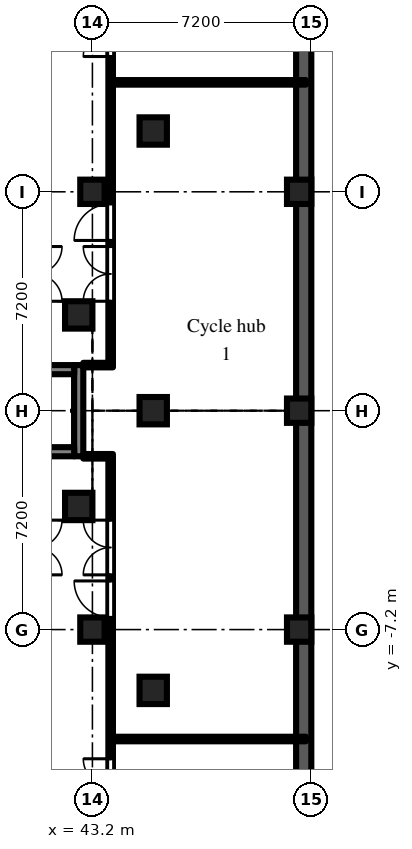
"""IFC4 building model, lengths in metres.
Left out: names, types, materials, properties, quantities, classifications, styles, units other than length and angle.
Written with IfcOpenShell. Run it as: python <this file> out.ifc"""

import sys

from ifc_helpers import new_model, si_unit, direction, frame, frame_2d, origin, origin_2d, place, context, subcontext, project, spatial, rectangle, extrude, element, fill, save


model = new_model("IFC4")
c1 = context("Model", 3, precision=1e-05, world=origin(), true_north=direction((0.0, 1.0)))
c2 = subcontext(c1, "Body", "Model", "MODEL_VIEW")
j1 = project(units=[si_unit("LENGTHUNIT", "METRE"), si_unit("PLANEANGLEUNIT", "RADIAN")], contexts=[c1])
p1 = place(None, origin())
s1 = spatial("IfcSite", under=j1, at=p1, CompositionType="ELEMENT")
p2 = place(p1, origin())
s2 = spatial("IfcBuilding", under=s1, at=p2, CompositionType="ELEMENT")
p3 = place(p2, frame((0.0, 0.0, -4.8)))
s3 = spatial("IfcBuildingStorey", under=s2, at=p3, CompositionType="ELEMENT", Elevation=-4.8)
p4 = place(p3, frame((50.15, -49.9, -0.5), z_axis=(0.0, 0.0, 1.0), x_axis=(0.0, 1.0, 0.0)))
e1 = element("IfcWall", 1, at=p4, inside=s3, PredefinedType="SOLIDWALL", context=c2, shape_type="SweptSolid", body=[
    extrude(rectangle(XDim=99.8, YDim=0.5, at=frame_2d((49.9, 0.0))), origin(), (0.0, 0.0, 1.0), 5.3),
])
for number, where, z_axis, x_axis in (
    (2, (42.75, -3.15, -0.5), (0.0, 0.0, 1.0), (1.0, 0.0, 0.0)),
    (3, (42.75, 3.15, -0.5), (0.0, 0.0, 1.0), (1.0, 0.0, 0.0)),
):
    element("IfcColumn", number, at=place(p3, frame(where, z_axis=z_axis, x_axis=x_axis)), inside=s3, PredefinedType="COLUMN", context=c2, shape_type="SweptSolid", body=[
        extrude(rectangle(XDim=0.9, YDim=0.9, at=origin_2d()), origin(), (0.0, 0.0, 1.0), 5.3),
    ])
for number, where, z_axis, x_axis in (
    (4, (43.2, -7.2, -0.5), (0.0, 0.0, 1.0), (1.0, 0.0, 0.0)),
    (5, (43.2, 7.2, -0.5), (0.0, 0.0, 1.0), (1.0, 0.0, 0.0)),
    (6, (50.0, -7.2, -0.5), (0.0, 0.0, 1.0), (1.0, 0.0, 0.0)),
    (7, (50.0, 0.0, -0.5), (0.0, 0.0, 1.0), (1.0, 0.0, 0.0)),
    (8, (50.0, 7.2, -0.5), (0.0, 0.0, 1.0), (1.0, 0.0, 0.0)),
):
    element("IfcColumn", number, at=place(p3, frame(where, z_axis=z_axis, x_axis=x_axis)), inside=s3, PredefinedType="COLUMN", context=c2, shape_type="SweptSolid", body=[
        extrude(rectangle(XDim=0.8, YDim=0.8, at=origin_2d()), origin(), (0.0, 0.0, 1.0), 5.3),
    ])
for number, where, z_axis, x_axis in (
    (9, (45.2, -9.2, -0.5), (0.0, 0.0, 1.0), (1.0, 0.0, 0.0)),
    (10, (45.2, 0.0, -0.5), (0.0, 0.0, 1.0), (1.0, 0.0, 0.0)),
    (11, (45.2, 9.2, -0.5), (0.0, 0.0, 1.0), (1.0, 0.0, 0.0)),
):
    element("IfcColumn", number, at=place(p3, frame(where, z_axis=z_axis, x_axis=x_axis)), inside=s3, PredefinedType="COLUMN", context=c2, shape_type="SweptSolid", body=[
        extrude(rectangle(XDim=0.9, YDim=0.9, at=origin_2d()), origin(), (0.0, 0.0, 1.0), 5.3),
    ])
p5 = place(p3, frame((42.75, -1.5, 0.0), z_axis=(0.0, 0.0, 1.0), x_axis=(0.0, 1.0, 0.0)))
e12 = element("IfcWall", 12, at=p5, inside=s3, PredefinedType="SHEAR", context=c2, shape_type="SweptSolid", body=[
    extrude(rectangle(XDim=3.0, YDim=0.3, at=frame_2d((1.5, 0.0))), origin(), (0.0, 0.0, 1.0), 4.35),
])
for number, where, z_axis, x_axis in (
    (13, (36.8, -1.35, 0.0), (0.0, 0.0, 1.0), (1.0, 0.0, 0.0)),
    (14, (36.8, 1.35, 0.0), (0.0, 0.0, 1.0), (1.0, 0.0, 0.0)),
):
    element("IfcWall", number, at=place(p3, frame(where, z_axis=z_axis, x_axis=x_axis)), inside=s3, PredefinedType="SHEAR", context=c2, shape_type="SweptSolid", body=[
        extrude(rectangle(XDim=5.8, YDim=0.3, at=frame_2d((2.9, 0.0))), origin(), (0.0, 0.0, 1.0), 4.35),
    ])
for number, where, z_axis, x_axis in (
    (15, (42.9, -1.5, 0.0), (0.0, 0.0, 1.0), (1.0, 0.0, 0.0)),
    (16, (42.9, 1.5, 0.0), (0.0, 0.0, 1.0), (1.0, 0.0, 0.0)),
):
    element("IfcWall", number, at=place(p3, frame(where, z_axis=z_axis, x_axis=x_axis)), inside=s3, PredefinedType="PARTITIONING", context=c2, shape_type="SweptSolid", body=[
        extrude(rectangle(XDim=0.975, YDim=0.15, at=frame_2d((0.488, 0.0))), origin(), (0.0, 0.0, 1.0), 4.35),
    ])
p6 = place(p3, frame((43.8, -31.275, 0.0), z_axis=(0.0, 0.0, 1.0), x_axis=(0.0, 1.0, 0.0)))
e17 = element("IfcWall", 17, at=p6, inside=s3, PredefinedType="PARTITIONING", context=c2, shape_type="SweptSolid", body=[
    extrude(rectangle(XDim=29.7, YDim=0.15, at=frame_2d((14.85, 0.0))), origin(), (0.0, 0.0, 1.0), 4.35),
])
p7 = place(p6, frame((3.625, 0.0, 0.0)))
e18 = element("IfcOpeningElement", 18, at=p7, cuts=e17, PredefinedType="OPENING", context=c2, shape_type="SweptSolid", body=[
    extrude(rectangle(XDim=1.8, YDim=2.1, at=frame_2d((0.9, 1.05))), frame((0.0, 0.085, 0.0), z_axis=(0.0, -1.0, 0.0), x_axis=(1.0, 0.0, 0.0)), (0.0, 0.0, 1.0), 0.17),
])
p8 = place(p6, frame((24.475, 0.0, 0.0)))
e19 = element("IfcOpeningElement", 19, at=p8, cuts=e17, PredefinedType="OPENING", context=c2, shape_type="SweptSolid", body=[
    extrude(rectangle(XDim=1.2, YDim=2.1, at=frame_2d((0.6, 1.05))), frame((0.0, 0.085, 0.0), z_axis=(0.0, -1.0, 0.0), x_axis=(1.0, 0.0, 0.0)), (0.0, 0.0, 1.0), 0.17),
])
p9 = place(p6, frame((25.875, 0.0, 0.0)))
e20 = element("IfcOpeningElement", 20, at=p9, cuts=e17, PredefinedType="OPENING", context=c2, shape_type="SweptSolid", body=[
    extrude(rectangle(XDim=1.8, YDim=2.1, at=frame_2d((0.9, 1.05))), frame((0.0, 0.085, 0.0), z_axis=(0.0, -1.0, 0.0), x_axis=(1.0, 0.0, 0.0)), (0.0, 0.0, 1.0), 0.17),
])
p10 = place(p6, frame((6.925, 0.0, 0.0)))
e21 = element("IfcOpeningElement", 21, at=p10, cuts=e17, PredefinedType="OPENING", context=c2, shape_type="SweptSolid", body=[
    extrude(rectangle(XDim=1.8, YDim=2.1, at=frame_2d((0.9, 1.05))), frame((0.0, 0.085, 0.0), z_axis=(0.0, -1.0, 0.0), x_axis=(1.0, 0.0, 0.0)), (0.0, 0.0, 1.0), 0.17),
])
p11 = place(p6, frame((18.025, 0.0, 0.0)))
e22 = element("IfcOpeningElement", 22, at=p11, cuts=e17, PredefinedType="OPENING", context=c2, shape_type="SweptSolid", body=[
    extrude(rectangle(XDim=1.8, YDim=2.1, at=frame_2d((0.9, 1.05))), frame((0.0, 0.085, 0.0), z_axis=(0.0, -1.0, 0.0), x_axis=(1.0, 0.0, 0.0)), (0.0, 0.0, 1.0), 0.17),
])
p12 = place(p3, frame((43.875, -10.8, 0.0), z_axis=(0.0, 0.0, 1.0), x_axis=(1.0, 0.0, 0.0)))
e23 = element("IfcWall", 23, at=p12, inside=s3, PredefinedType="PARTITIONING", context=c2, shape_type="SweptSolid", body=[
    extrude(rectangle(XDim=6.345, YDim=0.15, at=frame_2d((3.172, 0.0))), origin(), (0.0, 0.0, 1.0), 4.35),
])
p13 = place(p3, frame((43.8, 1.575, 0.0), z_axis=(0.0, 0.0, 1.0), x_axis=(0.0, 1.0, 0.0)))
e24 = element("IfcWall", 24, at=p13, inside=s3, PredefinedType="PARTITIONING", context=c2, shape_type="SweptSolid", body=[
    extrude(rectangle(XDim=29.7, YDim=0.15, at=frame_2d((14.85, 0.0))), origin(), (0.0, 0.0, 1.0), 4.35),
])
p14 = place(p13, frame((24.775, 0.0, 0.0)))
e25 = element("IfcOpeningElement", 25, at=p14, cuts=e24, PredefinedType="OPENING", context=c2, shape_type="SweptSolid", body=[
    extrude(rectangle(XDim=1.2, YDim=2.1, at=frame_2d((0.6, 1.05))), frame((0.0, 0.085, 0.0), z_axis=(0.0, -1.0, 0.0), x_axis=(1.0, 0.0, 0.0)), (0.0, 0.0, 1.0), 0.17),
])
p15 = place(p13, frame((10.075, 0.0, 0.0)))
e26 = element("IfcOpeningElement", 26, at=p15, cuts=e24, PredefinedType="OPENING", context=c2, shape_type="SweptSolid", body=[
    extrude(rectangle(XDim=1.8, YDim=2.1, at=frame_2d((0.9, 1.05))), frame((0.0, 0.085, 0.0), z_axis=(0.0, -1.0, 0.0), x_axis=(1.0, 0.0, 0.0)), (0.0, 0.0, 1.0), 0.17),
])
p16 = place(p13, frame((21.175, 0.0, 0.0)))
e27 = element("IfcOpeningElement", 27, at=p16, cuts=e24, PredefinedType="OPENING", context=c2, shape_type="SweptSolid", body=[
    extrude(rectangle(XDim=1.8, YDim=2.1, at=frame_2d((0.9, 1.05))), frame((0.0, 0.085, 0.0), z_axis=(0.0, -1.0, 0.0), x_axis=(1.0, 0.0, 0.0)), (0.0, 0.0, 1.0), 0.17),
])
p17 = place(p13, frame((2.025, 0.0, 0.0)))
e28 = element("IfcOpeningElement", 28, at=p17, cuts=e24, PredefinedType="OPENING", context=c2, shape_type="SweptSolid", body=[
    extrude(rectangle(XDim=1.8, YDim=2.1, at=frame_2d((0.9, 1.05))), frame((0.0, 0.085, 0.0), z_axis=(0.0, -1.0, 0.0), x_axis=(1.0, 0.0, 0.0)), (0.0, 0.0, 1.0), 0.17),
])
p18 = place(p13, frame((4.025, 0.0, 0.0)))
e29 = element("IfcOpeningElement", 29, at=p18, cuts=e24, PredefinedType="OPENING", context=c2, shape_type="SweptSolid", body=[
    extrude(rectangle(XDim=1.2, YDim=2.1, at=frame_2d((0.6, 1.05))), frame((0.0, 0.085, 0.0), z_axis=(0.0, -1.0, 0.0), x_axis=(1.0, 0.0, 0.0)), (0.0, 0.0, 1.0), 0.17),
])
p19 = place(p3, frame((43.875, 10.8, 0.0), z_axis=(0.0, 0.0, 1.0), x_axis=(1.0, 0.0, 0.0)))
e30 = element("IfcWall", 30, at=p19, inside=s3, PredefinedType="PARTITIONING", context=c2, shape_type="SweptSolid", body=[
    extrude(rectangle(XDim=6.345, YDim=0.15, at=frame_2d((3.172, 0.0))), origin(), (0.0, 0.0, 1.0), 4.35),
])
p20 = place(p15, origin())
e31 = element("IfcDoor", 31, at=p20, inside=s3, OperationType="DOUBLE_DOOR_DOUBLE_SWING", PredefinedType="DOOR", context=c2, shape_type="SweptSolid", body=[
    extrude(rectangle(XDim=1.8, YDim=2.1, at=frame_2d((0.9, 1.05))), frame((0.0, 0.025, 0.0), z_axis=(0.0, -1.0, 0.0), x_axis=(1.0, 0.0, 0.0)), (0.0, 0.0, 1.0), 0.05),
])
fill(e26, e31)
p21 = place(p8, origin())
e32 = element("IfcDoor", 32, at=p21, inside=s3, OperationType="SINGLE_SWING_RIGHT", PredefinedType="DOOR", context=c2, shape_type="SweptSolid", body=[
    extrude(rectangle(XDim=1.2, YDim=2.1, at=frame_2d((0.6, 1.05))), frame((0.0, 0.025, 0.0), z_axis=(0.0, -1.0, 0.0), x_axis=(1.0, 0.0, 0.0)), (0.0, 0.0, 1.0), 0.05),
])
fill(e19, e32)
p22 = place(p9, origin())
e33 = element("IfcDoor", 33, at=p22, inside=s3, OperationType="DOUBLE_DOOR_DOUBLE_SWING", PredefinedType="DOOR", context=c2, shape_type="SweptSolid", body=[
    extrude(rectangle(XDim=1.8, YDim=2.1, at=frame_2d((0.9, 1.05))), frame((0.0, 0.025, 0.0), z_axis=(0.0, -1.0, 0.0), x_axis=(1.0, 0.0, 0.0)), (0.0, 0.0, 1.0), 0.05),
])
fill(e20, e33)
p23 = place(p17, origin())
e34 = element("IfcDoor", 34, at=p23, inside=s3, OperationType="DOUBLE_DOOR_DOUBLE_SWING", PredefinedType="DOOR", context=c2, shape_type="SweptSolid", body=[
    extrude(rectangle(XDim=1.8, YDim=2.1, at=frame_2d((0.9, 1.05))), frame((0.0, 0.025, 0.0), z_axis=(0.0, -1.0, 0.0), x_axis=(1.0, 0.0, 0.0)), (0.0, 0.0, 1.0), 0.05),
])
fill(e28, e34)
p24 = place(p18, origin())
e35 = element("IfcDoor", 35, at=p24, inside=s3, OperationType="SINGLE_SWING_LEFT", PredefinedType="DOOR", context=c2, shape_type="SweptSolid", body=[
    extrude(rectangle(XDim=1.2, YDim=2.1, at=frame_2d((0.6, 1.05))), frame((0.0, 0.025, 0.0), z_axis=(0.0, -1.0, 0.0), x_axis=(1.0, 0.0, 0.0)), (0.0, 0.0, 1.0), 0.05),
])
fill(e29, e35)
p25 = place(p11, origin())
e36 = element("IfcDoor", 36, at=p25, inside=s3, OperationType="DOUBLE_DOOR_DOUBLE_SWING", PredefinedType="DOOR", context=c2, shape_type="SweptSolid", body=[
    extrude(rectangle(XDim=1.8, YDim=2.1, at=frame_2d((0.9, 1.05))), frame((0.0, 0.025, 0.0), z_axis=(0.0, -1.0, 0.0), x_axis=(1.0, 0.0, 0.0)), (0.0, 0.0, 1.0), 0.05),
])
fill(e22, e36)
save(model, sys.argv[1])
